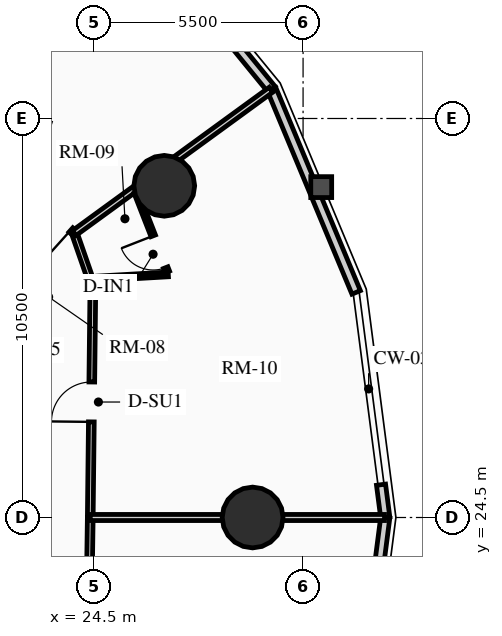
"""IFC4 building model, lengths in metres.
Left out: names, types, materials, properties, quantities, classifications, styles, units other than length and angle.
Written with IfcOpenShell. Run it as: python <this file> out.ifc"""

import sys

from ifc_helpers import new_model, si_unit, direction, frame, frame_2d, origin, origin_2d, place, context, subcontext, project, spatial, rectangle, circle, extrude, source, transform, mapped, element, fill, save


model = new_model("IFC4")
c1 = context("Model", 3, precision=1e-05, world=origin(), true_north=direction((0.0, 1.0)))
c2 = subcontext(c1, "Body", "Model", "MODEL_VIEW")
j1 = project(units=[si_unit("LENGTHUNIT", "METRE"), si_unit("PLANEANGLEUNIT", "RADIAN")], contexts=[c1])
p1 = place(None, origin())
s1 = spatial("IfcSite", under=j1, at=p1, CompositionType="ELEMENT")
p2 = place(p1, origin())
s2 = spatial("IfcBuilding", under=s1, at=p2, CompositionType="ELEMENT")
p3 = place(p2, frame((0.0, 0.0, 51.1)))
s3 = spatial("IfcBuildingStorey", under=s2, at=p3, CompositionType="ELEMENT", Elevation=51.1)
for number, where, z_axis, x_axis in (
    (1, (28.672, 24.5, 0.0), (0.0, 0.0, 1.0), (1.0, 0.0, 0.0)),
    (2, (26.347, 33.229, 0.0), (0.0, 0.0, 1.0), (1.0, 0.0, 0.0)),
):
    element("IfcColumn", number, at=place(p3, frame(where, z_axis=z_axis, x_axis=x_axis)), inside=s3, PredefinedType="USERDEFINED", context=c2, shape_type="SweptSolid", body=[
        extrude(circle(Radius=0.8, at=origin_2d()), origin(), (0.0, 0.0, 1.0), 2.91),
    ])
p4 = place(p3, frame((32.051, 25.363, 0.0), z_axis=(0.0, 0.0, 1.0), x_axis=(0.128523364007, -0.991706481225, 0.0)))
e3 = element("IfcWall", 3, at=p4, inside=s3, PredefinedType="SOLIDWALL", context=c2, shape_type="SweptSolid", body=[
    extrude(rectangle(XDim=0.87, YDim=0.24, at=frame_2d((0.435, 0.0))), origin(), (0.0, 0.0, 1.0), 2.635),
])
p5 = place(p3, frame((29.172, 35.768, 0.0), z_axis=(0.0, 0.0, 1.0), x_axis=(0.384348836956, -0.923187939442, 0.0)))
e4 = element("IfcWall", 4, at=p5, inside=s3, PredefinedType="SOLIDWALL", context=c2, shape_type="SweptSolid", body=[
    extrude(rectangle(XDim=5.789, YDim=0.24, at=frame_2d((2.894, 0.0))), origin(), (0.0, 0.0, 1.0), 2.073),
])
p6 = place(p3, frame((25.707, 40.009, 0.0), z_axis=(0.0, 0.0, 1.0), x_axis=(0.632713287022, -0.77438614168, 0.0)))
e5 = element("IfcWall", 5, at=p6, inside=s3, PredefinedType="SOLIDWALL", context=c2, shape_type="SweptSolid", body=[
    extrude(rectangle(XDim=5.477, YDim=0.24, at=frame_2d((2.738, 0.0))), origin(), (0.0, 0.0, 1.0), 2.073),
])
m1 = source(origin(), c2, "Body", "SweptSolid", [
    extrude(rectangle(XDim=1.9, YDim=1.35, at=frame_2d((0.95, 0.675))), frame((0.0, 0.13, 0.0), z_axis=(0.0, -1.0, 0.0), x_axis=(1.0, 0.0, 0.0)), (0.0, 0.0, 1.0), 0.26),
])
p7 = place(p6, frame((1.788, 0.0, 0.65)))
e6 = element("IfcOpeningElement", 6, at=p7, cuts=e5, PredefinedType="OPENING", context=c2, shape_type="MappedRepresentation", body=[
    mapped(m1, transform((0.0, 0.0, 0.0), x_axis=(1.0, 0.0, 0.0), y_axis=(0.0, 1.0, 0.0), z_axis=(0.0, 0.0, 1.0), scale=1.0)),
])
p8 = place(p3, frame((32.163, 24.5, 0.0), z_axis=(0.0, 0.0, 1.0), x_axis=(-0.128339641463, -0.991730274031, 0.0)))
e7 = element("IfcWall", 7, at=p8, inside=s3, PredefinedType="SOLIDWALL", context=c2, shape_type="SweptSolid", body=[
    extrude(rectangle(XDim=5.973, YDim=0.24, at=frame_2d((2.987, 0.0))), origin(), (0.0, 0.0, 1.0), 2.073),
])
p9 = place(p8, frame((2.037, 0.0, 0.65)))
e8 = element("IfcOpeningElement", 8, at=p9, cuts=e7, PredefinedType="OPENING", context=c2, shape_type="MappedRepresentation", body=[
    mapped(m1, transform((0.0, 0.0, 0.0), x_axis=(1.0, 0.0, 0.0), y_axis=(0.0, 1.0, 0.0), z_axis=(0.0, 0.0, 1.0), scale=1.0)),
])
p10 = place(p3, frame((24.4, 24.5, 0.0), z_axis=(0.0, 0.0, 1.0), x_axis=(0.011359710161, 0.999935476411, 0.0)))
e9 = element("IfcWall", 9, at=p10, inside=s3, PredefinedType="PARTITIONING", context=c2, shape_type="SweptSolid", body=[
    extrude(rectangle(XDim=6.082, YDim=0.15, at=frame_2d((3.041, 0.0))), origin(), (0.0, 0.0, 1.0), 2.159),
])
m2 = source(origin(), c2, "Body", "SweptSolid", [
    extrude(rectangle(XDim=1.05, YDim=2.015, at=frame_2d((0.525, 1.007))), frame((0.0, 0.085, 0.0), z_axis=(0.0, -1.0, 0.0), x_axis=(1.0, 0.0, 0.0)), (0.0, 0.0, 1.0), 0.17),
])
p11 = place(p10, frame((2.516, 0.0, 0.0)))
e10 = element("IfcOpeningElement", 10, at=p11, cuts=e9, PredefinedType="OPENING", context=c2, shape_type="MappedRepresentation", body=[
    mapped(m2, transform((0.0, 0.0, 0.0), x_axis=(1.0, 0.0, 0.0), y_axis=(0.0, 1.0, 0.0), z_axis=(0.0, 0.0, 1.0), scale=1.0)),
])
p12 = place(p3, frame((24.469, 30.582, 0.0), z_axis=(0.0, 0.0, 1.0), x_axis=(-0.328902536986, 0.944363871166, 0.0)))
e11 = element("IfcWall", 11, at=p12, inside=s3, PredefinedType="PARTITIONING", context=c2, shape_type="SweptSolid", body=[
    extrude(rectangle(XDim=1.488, YDim=0.15, at=frame_2d((0.744, 0.0))), origin(), (0.0, 0.0, 1.0), 2.205),
])
p13 = place(p3, frame((23.98, 31.987, 0.0), z_axis=(0.0, 0.0, 1.0), x_axis=(-0.744317922268, 0.667825449193, 0.0)))
e12 = element("IfcWall", 12, at=p13, inside=s3, PredefinedType="PARTITIONING", context=c2, shape_type="SweptSolid", body=[
    extrude(rectangle(XDim=1.481, YDim=0.15, at=frame_2d((0.74, 0.0))), origin(), (0.0, 0.0, 1.0), 2.159),
])
p14 = place(p13, frame((0.12, 0.0, 0.0)))
e13 = element("IfcOpeningElement", 13, at=p14, cuts=e12, PredefinedType="OPENING", context=c2, shape_type="MappedRepresentation", body=[
    mapped(m2, transform((0.0, 0.0, 0.0), x_axis=(1.0, 0.0, 0.0), y_axis=(0.0, 1.0, 0.0), z_axis=(0.0, 0.0, 1.0), scale=1.0)),
])
p15 = place(p3, frame((24.313, 18.529, 0.0), z_axis=(0.0, 0.0, 1.0), x_axis=(0.014472275982, 0.99989527113, 0.0)))
e14 = element("IfcWall", 14, at=p15, inside=s3, PredefinedType="PARTITIONING", context=c2, shape_type="SweptSolid", body=[
    extrude(rectangle(XDim=5.972, YDim=0.15, at=frame_2d((2.986, 0.0))), origin(), (0.0, 0.0, 1.0), 2.635),
])
m3 = source(origin(), c2, "Body", "SweptSolid", [
    extrude(rectangle(XDim=1.0, YDim=2.015, at=frame_2d((0.5, 1.007))), frame((0.0, 0.085, 0.0), z_axis=(0.0, -1.0, 0.0), x_axis=(1.0, 0.0, 0.0)), (0.0, 0.0, 1.0), 0.17),
])
p16 = place(p15, frame((2.486, 0.0, 0.0)))
e15 = element("IfcOpeningElement", 15, at=p16, cuts=e14, PredefinedType="OPENING", context=c2, shape_type="MappedRepresentation", body=[
    mapped(m3, transform((0.0, 0.0, 0.0), x_axis=(1.0, 0.0, 0.0), y_axis=(0.0, 1.0, 0.0), z_axis=(0.0, 0.0, 1.0), scale=1.0)),
])
p17 = place(p3, frame((24.4, 24.5, 0.0), z_axis=(0.0, 0.0, 1.0), x_axis=(1.0, 0.0, 0.0)))
e16 = element("IfcWall", 16, at=p17, inside=s3, PredefinedType="PARTITIONING", context=c2, shape_type="SweptSolid", body=[
    extrude(rectangle(XDim=7.743, YDim=0.16, at=frame_2d((3.872, 0.0))), origin(), (0.0, 0.0, 1.0), 2.073),
])
p18 = place(p3, frame((23.98, 31.987, 0.0), z_axis=(0.0, 0.0, 1.0), x_axis=(0.80834018144, 0.588715679313, 0.0)))
e17 = element("IfcWall", 17, at=p18, inside=s3, PredefinedType="PARTITIONING", context=c2, shape_type="SweptSolid", body=[
    extrude(rectangle(XDim=6.403, YDim=0.16, at=frame_2d((3.202, 0.0))), origin(), (0.0, 0.0, 1.0), 2.073),
])
p19 = place(p3, frame((24.601, 30.79, 0.0), z_axis=(0.0, 0.0, 1.0), x_axis=(0.998323904123, 0.057873849514, 0.0)))
e18 = element("IfcWall", 18, at=p19, inside=s3, PredefinedType="PARTITIONING", context=c2, shape_type="SweptSolid", body=[
    extrude(rectangle(XDim=1.856, YDim=0.125, at=frame_2d((0.928, 0.0))), origin(), (0.0, 0.0, 1.0), 2.205),
])
p20 = place(p3, frame((26.428, 30.963, 0.0), z_axis=(0.0, 0.0, 1.0), x_axis=(-0.364149471566, 0.931340519014, 0.0)))
e19 = element("IfcWall", 19, at=p20, inside=s3, PredefinedType="PARTITIONING", context=c2, shape_type="SweptSolid", body=[
    extrude(rectangle(XDim=2.247, YDim=0.125, at=frame_2d((1.124, 0.0))), origin(), (0.0, 0.0, 1.0), 2.159),
])
m4 = source(origin(), c2, "Body", "SweptSolid", [
    extrude(rectangle(XDim=0.9, YDim=2.005, at=frame_2d((0.45, 1.002))), frame((0.0, 0.073, 0.0), z_axis=(0.0, -1.0, 0.0), x_axis=(1.0, 0.0, 0.0)), (0.0, 0.0, 1.0), 0.145),
])
p21 = place(p20, frame((0.12, 0.0, 0.0)))
e20 = element("IfcOpeningElement", 20, at=p21, cuts=e19, PredefinedType="OPENING", context=c2, shape_type="MappedRepresentation", body=[
    mapped(m4, transform((0.0, 0.0, 0.0), x_axis=(1.0, 0.0, 0.0), y_axis=(0.0, 1.0, 0.0), z_axis=(0.0, 0.0, 1.0), scale=1.0)),
])
m5 = source(origin(), c2, "Body", "SweptSolid", [
    extrude(rectangle(XDim=1.05, YDim=2.015, at=frame_2d((0.525, 1.007))), frame((0.0, 0.025, 0.0), z_axis=(0.0, -1.0, 0.0), x_axis=(1.0, 0.0, 0.0)), (0.0, 0.0, 1.0), 0.05),
])
p22 = place(p11, origin())
e21 = element("IfcDoor", 21, at=p22, inside=s3, OperationType="SINGLE_SWING_LEFT", PredefinedType="DOOR", context=c2, shape_type="MappedRepresentation", body=[
    mapped(m5, transform((0.0, 0.0, 0.0), x_axis=(1.0, 0.0, 0.0), y_axis=(0.0, 1.0, 0.0), z_axis=(0.0, 0.0, 1.0), scale=1.0)),
])
fill(e10, e21)
m6 = source(origin(), c2, "Body", "SweptSolid", [
    extrude(rectangle(XDim=0.9, YDim=2.005, at=frame_2d((0.45, 1.002))), frame((0.0, 0.025, 0.0), z_axis=(0.0, -1.0, 0.0), x_axis=(1.0, 0.0, 0.0)), (0.0, 0.0, 1.0), 0.05),
])
p23 = place(p21, origin())
e22 = element("IfcDoor", 22, at=p23, inside=s3, OperationType="SINGLE_SWING_RIGHT", PredefinedType="DOOR", context=c2, shape_type="MappedRepresentation", body=[
    mapped(m6, transform((0.0, 0.0, 0.0), x_axis=(1.0, 0.0, 0.0), y_axis=(0.0, 1.0, 0.0), z_axis=(0.0, 0.0, 1.0), scale=1.0)),
])
fill(e20, e22)
p24 = place(p14, origin())
e23 = element("IfcDoor", 23, at=p24, inside=s3, OperationType="SINGLE_SWING_LEFT", PredefinedType="DOOR", context=c2, shape_type="MappedRepresentation", body=[
    mapped(m5, transform((0.0, 0.0, 0.0), x_axis=(1.0, 0.0, 0.0), y_axis=(0.0, 1.0, 0.0), z_axis=(0.0, 0.0, 1.0), scale=1.0)),
])
fill(e13, e23)
save(model, sys.argv[1])
